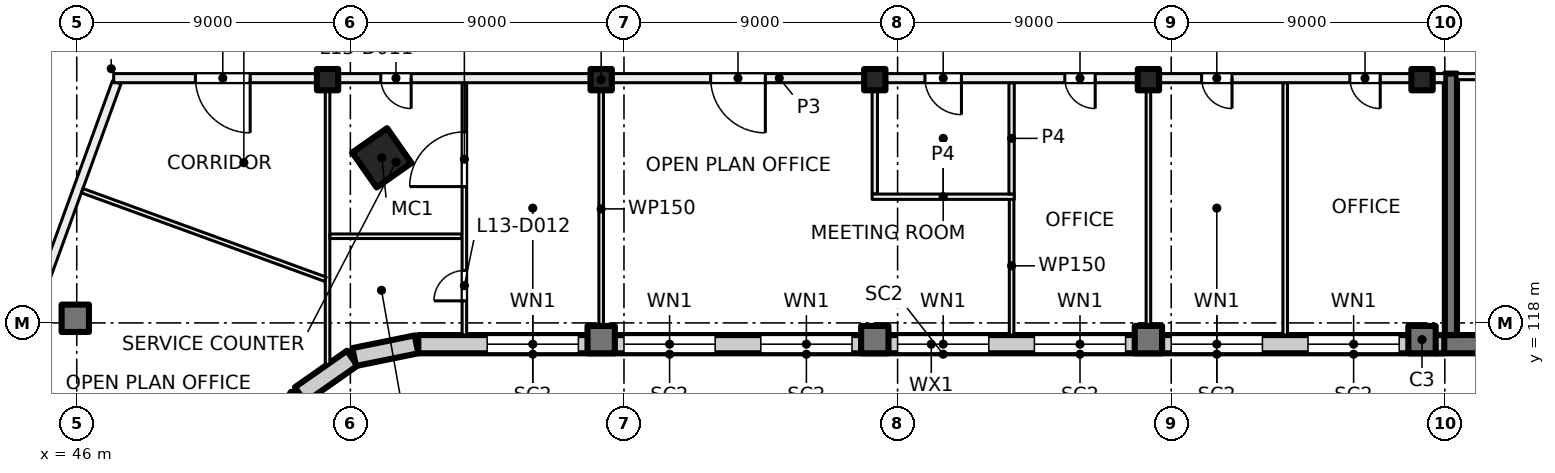
"""IFC4 building model, lengths in metres.
Left out: names, types, materials, properties, quantities, classifications, styles, units other than length and angle.
Written with IfcOpenShell. Run it as: python <this file> out.ifc"""

import sys

from ifc_helpers import new_model, si_unit, direction, frame, frame_2d, origin, origin_2d, place, context, subcontext, project, spatial, rectangle, hollow_rectangle, extrude, element, fill, save


model = new_model("IFC4")
c1 = context("Model", 3, precision=1e-05, world=origin(), true_north=direction((0.0, 1.0)))
c2 = subcontext(c1, "Body", "Model", "MODEL_VIEW")
j1 = project(units=[si_unit("LENGTHUNIT", "METRE"), si_unit("PLANEANGLEUNIT", "RADIAN")], contexts=[c1])
p1 = place(None, origin())
s1 = spatial("IfcSite", under=j1, at=p1, CompositionType="ELEMENT")
p2 = place(p1, origin())
s2 = spatial("IfcBuilding", under=s1, at=p2, CompositionType="ELEMENT")
p3 = place(p2, frame((0.0, 0.0, 59.5)))
s3 = spatial("IfcBuildingStorey", under=s2, at=p3, CompositionType="ELEMENT", Elevation=59.5)
p4 = place(p3, frame((56.036, 123.43, 0.0), z_axis=(0.0, 0.0, 1.0), x_axis=(0.573576436351, -0.819152044289, 0.0)))
e1 = element("IfcColumn", 1, at=p4, inside=s3, PredefinedType="COLUMN", context=c2, shape_type="SweptSolid", body=[
    extrude(hollow_rectangle(XDim=1.4, YDim=1.4, WallThickness=0.04, at=origin_2d()), origin(), (0.0, 0.0, 1.0), 4.0),
])
for number, where, z_axis, x_axis in (
    (2, (54.25, 126.0, 0.0), (0.0, 0.0, 1.0), (1.0, 0.0, 0.0)),
    (3, (63.25, 126.0, 0.0), (0.0, 0.0, 1.0), (1.0, 0.0, 0.0)),
    (4, (72.25, 126.0, 0.0), (0.0, 0.0, 1.0), (1.0, 0.0, 0.0)),
    (5, (81.25, 126.0, 0.0), (0.0, 0.0, 1.0), (1.0, 0.0, 0.0)),
    (6, (90.25, 126.0, 0.0), (0.0, 0.0, 1.0), (1.0, 0.0, 0.0)),
):
    element("IfcColumn", number, at=place(p3, frame(where, z_axis=z_axis, x_axis=x_axis)), inside=s3, PredefinedType="COLUMN", context=c2, shape_type="SweptSolid", body=[
        extrude(rectangle(XDim=0.7, YDim=0.7, at=origin_2d()), origin(), (0.0, 0.0, 1.0), 4.0),
    ])
for number, where, z_axis, x_axis in (
    (7, (45.952, 118.152, 0.0), (0.0, 0.0, 1.0), (1.0, 0.0, 0.0)),
    (8, (63.25, 117.45, 0.0), (0.0, 0.0, 1.0), (1.0, 0.0, 0.0)),
    (9, (72.25, 117.45, 0.0), (0.0, 0.0, 1.0), (1.0, 0.0, 0.0)),
    (10, (81.25, 117.45, 0.0), (0.0, 0.0, 1.0), (1.0, 0.0, 0.0)),
    (11, (90.25, 117.45, 0.0), (0.0, 0.0, 1.0), (1.0, 0.0, 0.0)),
):
    element("IfcColumn", number, at=place(p3, frame(where, z_axis=z_axis, x_axis=x_axis)), inside=s3, PredefinedType="COLUMN", context=c2, shape_type="SweptSolid", body=[
        extrude(rectangle(XDim=0.9, YDim=0.9, at=origin_2d()), origin(), (0.0, 0.0, 1.0), 4.0),
    ])
p5 = place(p3, frame((99.6, 117.3, 0.0), z_axis=(0.0, 0.0, 1.0), x_axis=(-1.0, 0.0, 0.0)))
e12 = element("IfcWall", 12, at=p5, inside=s3, PredefinedType="SHEAR", context=c2, shape_type="SweptSolid", body=[
    extrude(rectangle(XDim=8.9, YDim=0.6, at=frame_2d((4.45, 0.0))), origin(), (0.0, 0.0, 1.0), 4.0),
])
p6 = place(p3, frame((91.2, 126.2, 0.0), z_axis=(0.0, 0.0, 1.0), x_axis=(0.0, -1.0, 0.0)))
e13 = element("IfcWall", 13, at=p6, inside=s3, PredefinedType="SHEAR", context=c2, shape_type="SweptSolid", body=[
    extrude(rectangle(XDim=8.6, YDim=0.4, at=frame_2d((4.3, 0.0))), origin(), (0.0, 0.0, 1.0), 4.0),
])
p7 = place(p3, frame((53.305, 115.578, 0.0), z_axis=(0.0, 0.0, 1.0), x_axis=(-0.522402266438, -0.852699168535, 0.0)))
e14 = element("IfcWall", 14, at=p7, inside=s3, PredefinedType="SOLIDWALL", context=c2, shape_type="SweptSolid", body=[
    extrude(rectangle(XDim=2.042, YDim=0.6, at=frame_2d((1.021, 0.0))), origin(), (0.0, 0.0, 1.0), 3.625),
])
for number, where, z_axis, x_axis in (
    (15, (55.062, 116.839, 0.0), (0.0, 0.0, 1.0), (-0.819, -0.574, 0.0)),
    (16, (57.175, 117.294, 0.0), (0.0, 0.0, 1.0), (-0.98, -0.199, 0.0)),
):
    element("IfcWall", number, at=place(p3, frame(where, z_axis=z_axis, x_axis=x_axis)), inside=s3, PredefinedType="SOLIDWALL", context=c2, shape_type="SweptSolid", body=[
        extrude(rectangle(XDim=2.092, YDim=0.6, at=frame_2d((1.046, 0.0))), origin(), (0.0, 0.0, 1.0), 3.625),
    ])
p8 = place(p3, frame((90.98, 117.3, 0.0), z_axis=(0.0, 0.0, 1.0), x_axis=(-1.0, 0.0, 0.0)))
e17 = element("IfcWall", 17, at=p8, inside=s3, PredefinedType="SOLIDWALL", context=c2, shape_type="SweptSolid", body=[
    extrude(rectangle(XDim=33.745, YDim=0.6, at=frame_2d((16.873, 0.0))), origin(), (0.0, 0.0, 1.0), 3.625),
])
p9 = place(p8, frame((1.48, 0.0, 0.9)))
e18 = element("IfcOpeningElement", 18, at=p9, cuts=e17, PredefinedType="OPENING", context=c2, shape_type="SweptSolid", body=[
    extrude(rectangle(XDim=3.0, YDim=2.4, at=frame_2d((1.5, 1.2))), frame((0.0, 0.31, 0.0), z_axis=(0.0, -1.0, 0.0), x_axis=(1.0, 0.0, 0.0)), (0.0, 0.0, 1.0), 0.62),
])
p10 = place(p8, frame((5.98, 0.0, 0.9)))
e19 = element("IfcOpeningElement", 19, at=p10, cuts=e17, PredefinedType="OPENING", context=c2, shape_type="SweptSolid", body=[
    extrude(rectangle(XDim=3.0, YDim=2.4, at=frame_2d((1.5, 1.2))), frame((0.0, 0.31, 0.0), z_axis=(0.0, -1.0, 0.0), x_axis=(1.0, 0.0, 0.0)), (0.0, 0.0, 1.0), 0.62),
])
p11 = place(p8, frame((10.48, 0.0, 0.9)))
e20 = element("IfcOpeningElement", 20, at=p11, cuts=e17, PredefinedType="OPENING", context=c2, shape_type="SweptSolid", body=[
    extrude(rectangle(XDim=3.0, YDim=2.4, at=frame_2d((1.5, 1.2))), frame((0.0, 0.31, 0.0), z_axis=(0.0, -1.0, 0.0), x_axis=(1.0, 0.0, 0.0)), (0.0, 0.0, 1.0), 0.62),
])
p12 = place(p8, frame((14.98, 0.0, 0.9)))
e21 = element("IfcOpeningElement", 21, at=p12, cuts=e17, PredefinedType="OPENING", context=c2, shape_type="SweptSolid", body=[
    extrude(rectangle(XDim=3.0, YDim=2.4, at=frame_2d((1.5, 1.2))), frame((0.0, 0.31, 0.0), z_axis=(0.0, -1.0, 0.0), x_axis=(1.0, 0.0, 0.0)), (0.0, 0.0, 1.0), 0.62),
])
p13 = place(p8, frame((19.48, 0.0, 0.9)))
e22 = element("IfcOpeningElement", 22, at=p13, cuts=e17, PredefinedType="OPENING", context=c2, shape_type="SweptSolid", body=[
    extrude(rectangle(XDim=3.0, YDim=2.4, at=frame_2d((1.5, 1.2))), frame((0.0, 0.31, 0.0), z_axis=(0.0, -1.0, 0.0), x_axis=(1.0, 0.0, 0.0)), (0.0, 0.0, 1.0), 0.62),
])
p14 = place(p8, frame((23.98, 0.0, 0.9)))
e23 = element("IfcOpeningElement", 23, at=p14, cuts=e17, PredefinedType="OPENING", context=c2, shape_type="SweptSolid", body=[
    extrude(rectangle(XDim=3.0, YDim=2.4, at=frame_2d((1.5, 1.2))), frame((0.0, 0.31, 0.0), z_axis=(0.0, -1.0, 0.0), x_axis=(1.0, 0.0, 0.0)), (0.0, 0.0, 1.0), 0.62),
])
p15 = place(p8, frame((28.48, 0.0, 0.9)))
e24 = element("IfcOpeningElement", 24, at=p15, cuts=e17, PredefinedType="OPENING", context=c2, shape_type="SweptSolid", body=[
    extrude(rectangle(XDim=3.0, YDim=2.4, at=frame_2d((1.5, 1.2))), frame((0.0, 0.31, 0.0), z_axis=(0.0, -1.0, 0.0), x_axis=(1.0, 0.0, 0.0)), (0.0, 0.0, 1.0), 0.62),
])
p16 = place(p3, frame((95.2, 126.1, 0.0), z_axis=(0.0, 0.0, 1.0), x_axis=(-1.0, 0.0, 0.0)))
e25 = element("IfcWall", 25, at=p16, inside=s3, PredefinedType="PARTITIONING", context=c2, shape_type="SweptSolid", body=[
    extrude(rectangle(XDim=3.8, YDim=0.2, at=frame_2d((1.9, 0.0))), origin(), (0.0, 0.0, 1.0), 3.625),
])
p17 = place(p16, frame((0.3, 0.0, 0.0)))
e26 = element("IfcOpeningElement", 26, at=p17, cuts=e25, PredefinedType="OPENING", context=c2, shape_type="SweptSolid", body=[
    extrude(rectangle(XDim=1.2, YDim=2.1, at=frame_2d((0.6, 1.05))), frame((0.0, 0.11, 0.0), z_axis=(0.0, -1.0, 0.0), x_axis=(1.0, 0.0, 0.0)), (0.0, 0.0, 1.0), 0.22),
])
p18 = place(p3, frame((47.314, 125.909, 0.0), z_axis=(0.0, 0.0, 1.0), x_axis=(-0.342010770371, -0.939696032209, 0.0)))
e27 = element("IfcWall", 27, at=p18, inside=s3, PredefinedType="PARTITIONING", context=c2, shape_type="SweptSolid", body=[
    extrude(rectangle(XDim=31.485, YDim=0.3, at=frame_2d((15.742, 0.0))), origin(), (0.0, 0.0, 1.0), 3.625),
])
p19 = place(p18, frame((28.359, 0.0, 0.0)))
e28 = element("IfcOpeningElement", 28, at=p19, cuts=e27, PredefinedType="OPENING", context=c2, shape_type="SweptSolid", body=[
    extrude(rectangle(XDim=1.0, YDim=2.1, at=frame_2d((0.5, 1.05))), frame((0.0, 0.16, 0.0), z_axis=(0.0, -1.0, 0.0), x_axis=(1.0, 0.0, 0.0)), (0.0, 0.0, 1.0), 0.32),
])
p20 = place(p18, frame((23.484, 0.0, 0.0)))
e29 = element("IfcOpeningElement", 29, at=p20, cuts=e27, PredefinedType="OPENING", context=c2, shape_type="SweptSolid", body=[
    extrude(rectangle(XDim=1.0, YDim=2.1, at=frame_2d((0.5, 1.05))), frame((0.0, 0.16, 0.0), z_axis=(0.0, -1.0, 0.0), x_axis=(1.0, 0.0, 0.0)), (0.0, 0.0, 1.0), 0.32),
])
p21 = place(p18, frame((13.834, 0.0, 0.0)))
e30 = element("IfcOpeningElement", 30, at=p21, cuts=e27, PredefinedType="OPENING", context=c2, shape_type="SweptSolid", body=[
    extrude(rectangle(XDim=1.8, YDim=2.1, at=frame_2d((0.9, 1.05))), frame((0.0, 0.16, 0.0), z_axis=(0.0, -1.0, 0.0), x_axis=(1.0, 0.0, 0.0)), (0.0, 0.0, 1.0), 0.32),
])
p22 = place(p3, frame((54.25, 116.637, 0.0), z_axis=(0.0, 0.0, 1.0), x_axis=(0.0, 1.0, 0.0)))
e31 = element("IfcWall", 31, at=p22, inside=s3, PredefinedType="PARTITIONING", context=c2, shape_type="SweptSolid", body=[
    extrude(rectangle(XDim=9.263, YDim=0.15, at=frame_2d((4.631, 0.0))), origin(), (0.0, 0.0, 1.0), 3.625),
])
p23 = place(p3, frame((54.18, 119.436, 0.0), z_axis=(0.0, 0.0, 1.0), x_axis=(-0.939669476286, 0.342083725624, 0.0)))
e32 = element("IfcWall", 32, at=p23, inside=s3, PredefinedType="PARTITIONING", context=c2, shape_type="SweptSolid", body=[
    extrude(rectangle(XDim=8.516, YDim=0.15, at=frame_2d((4.258, 0.0))), origin(), (0.0, 0.0, 1.0), 3.625),
])
p24 = place(p3, frame((54.325, 120.85, 0.0), z_axis=(0.0, 0.0, 1.0), x_axis=(1.0, 0.0, 0.0)))
e33 = element("IfcWall", 33, at=p24, inside=s3, PredefinedType="PARTITIONING", context=c2, shape_type="SweptSolid", body=[
    extrude(rectangle(XDim=4.35, YDim=0.15, at=frame_2d((2.175, 0.0))), origin(), (0.0, 0.0, 1.0), 3.625),
])
p25 = place(p3, frame((58.75, 117.6, 0.0), z_axis=(0.0, 0.0, 1.0), x_axis=(0.0, 1.0, 0.0)))
e34 = element("IfcWall", 34, at=p25, inside=s3, PredefinedType="PARTITIONING", context=c2, shape_type="SweptSolid", body=[
    extrude(rectangle(XDim=8.3, YDim=0.15, at=frame_2d((4.15, 0.0))), origin(), (0.0, 0.0, 1.0), 3.625),
])
p26 = place(p25, frame((1.125, 0.0, 0.0)))
e35 = element("IfcOpeningElement", 35, at=p26, cuts=e34, PredefinedType="OPENING", context=c2, shape_type="SweptSolid", body=[
    extrude(rectangle(XDim=1.0, YDim=2.1, at=frame_2d((0.5, 1.05))), frame((0.0, 0.085, 0.0), z_axis=(0.0, -1.0, 0.0), x_axis=(1.0, 0.0, 0.0)), (0.0, 0.0, 1.0), 0.17),
])
p27 = place(p25, frame((4.884, 0.0, 0.0)))
e36 = element("IfcOpeningElement", 36, at=p27, cuts=e34, PredefinedType="OPENING", context=c2, shape_type="SweptSolid", body=[
    extrude(rectangle(XDim=1.8, YDim=2.1, at=frame_2d((0.9, 1.05))), frame((0.0, 0.085, 0.0), z_axis=(0.0, -1.0, 0.0), x_axis=(1.0, 0.0, 0.0)), (0.0, 0.0, 1.0), 0.17),
])
p28 = place(p3, frame((63.25, 117.6, 0.0), z_axis=(0.0, 0.0, 1.0), x_axis=(0.0, 1.0, 0.0)))
e37 = element("IfcWall", 37, at=p28, inside=s3, PredefinedType="PARTITIONING", context=c2, shape_type="SweptSolid", body=[
    extrude(rectangle(XDim=8.3, YDim=0.15, at=frame_2d((4.15, 0.0))), origin(), (0.0, 0.0, 1.0), 3.625),
])
p29 = place(p3, frame((72.25, 122.238, 0.0), z_axis=(0.0, 0.0, 1.0), x_axis=(0.0, 1.0, 0.0)))
e38 = element("IfcWall", 38, at=p29, inside=s3, PredefinedType="PARTITIONING", context=c2, shape_type="SweptSolid", body=[
    extrude(rectangle(XDim=3.662, YDim=0.175, at=frame_2d((1.831, 0.0))), origin(), (0.0, 0.0, 1.0), 3.625),
])
p30 = place(p3, frame((76.75, 117.6, 0.0), z_axis=(0.0, 0.0, 1.0), x_axis=(0.0, 1.0, 0.0)))
e39 = element("IfcWall", 39, at=p30, inside=s3, PredefinedType="PARTITIONING", context=c2, shape_type="SweptSolid", body=[
    extrude(rectangle(XDim=4.553, YDim=0.15, at=frame_2d((2.276, 0.0))), origin(), (0.0, 0.0, 1.0), 3.625),
])
p31 = place(p3, frame((76.838, 122.15, 0.0), z_axis=(0.0, 0.0, 1.0), x_axis=(-1.0, 0.0, 0.0)))
e40 = element("IfcWall", 40, at=p31, inside=s3, PredefinedType="PARTITIONING", context=c2, shape_type="SweptSolid", body=[
    extrude(rectangle(XDim=4.676, YDim=0.175, at=frame_2d((2.338, 0.0))), origin(), (0.0, 0.0, 1.0), 3.625),
])
p32 = place(p3, frame((76.75, 122.238, 0.0), z_axis=(0.0, 0.0, 1.0), x_axis=(0.0, 1.0, 0.0)))
e41 = element("IfcWall", 41, at=p32, inside=s3, PredefinedType="PARTITIONING", context=c2, shape_type="SweptSolid", body=[
    extrude(rectangle(XDim=3.662, YDim=0.175, at=frame_2d((1.831, 0.0))), origin(), (0.0, 0.0, 1.0), 3.625),
])
for number, where, z_axis, x_axis in (
    (42, (81.25, 117.6, 0.0), (0.0, 0.0, 1.0), (0.0, 1.0, 0.0)),
    (43, (85.75, 117.6, 0.0), (0.0, 0.0, 1.0), (0.0, 1.0, 0.0)),
):
    element("IfcWall", number, at=place(p3, frame(where, z_axis=z_axis, x_axis=x_axis)), inside=s3, PredefinedType="PARTITIONING", context=c2, shape_type="SweptSolid", body=[
        extrude(rectangle(XDim=8.3, YDim=0.15, at=frame_2d((4.15, 0.0))), origin(), (0.0, 0.0, 1.0), 3.625),
    ])
p33 = place(p3, frame((91.0, 126.05, 0.0), z_axis=(0.0, 0.0, 1.0), x_axis=(-1.0, 0.0, 0.0)))
e44 = element("IfcWall", 44, at=p33, inside=s3, PredefinedType="PARTITIONING", context=c2, shape_type="SweptSolid", body=[
    extrude(rectangle(XDim=43.785, YDim=0.3, at=frame_2d((21.893, 0.0))), origin(), (0.0, 0.0, 1.0), 3.625),
])
p34 = place(p33, frame((2.125, 0.0, 0.0)))
e45 = element("IfcOpeningElement", 45, at=p34, cuts=e44, PredefinedType="OPENING", context=c2, shape_type="SweptSolid", body=[
    extrude(rectangle(XDim=1.0, YDim=2.1, at=frame_2d((0.5, 1.05))), frame((0.0, 0.16, 0.0), z_axis=(0.0, -1.0, 0.0), x_axis=(1.0, 0.0, 0.0)), (0.0, 0.0, 1.0), 0.32),
])
p35 = place(p33, frame((7.0, 0.0, 0.0)))
e46 = element("IfcOpeningElement", 46, at=p35, cuts=e44, PredefinedType="OPENING", context=c2, shape_type="SweptSolid", body=[
    extrude(rectangle(XDim=1.0, YDim=2.1, at=frame_2d((0.5, 1.05))), frame((0.0, 0.16, 0.0), z_axis=(0.0, -1.0, 0.0), x_axis=(1.0, 0.0, 0.0)), (0.0, 0.0, 1.0), 0.32),
])
p36 = place(p33, frame((11.5, 0.0, 0.0)))
e47 = element("IfcOpeningElement", 47, at=p36, cuts=e44, PredefinedType="OPENING", context=c2, shape_type="SweptSolid", body=[
    extrude(rectangle(XDim=1.0, YDim=2.1, at=frame_2d((0.5, 1.05))), frame((0.0, 0.16, 0.0), z_axis=(0.0, -1.0, 0.0), x_axis=(1.0, 0.0, 0.0)), (0.0, 0.0, 1.0), 0.32),
])
p37 = place(p33, frame((15.9, 0.0, 0.0)))
e48 = element("IfcOpeningElement", 48, at=p37, cuts=e44, PredefinedType="OPENING", context=c2, shape_type="SweptSolid", body=[
    extrude(rectangle(XDim=1.2, YDim=2.1, at=frame_2d((0.6, 1.05))), frame((0.0, 0.16, 0.0), z_axis=(0.0, -1.0, 0.0), x_axis=(1.0, 0.0, 0.0)), (0.0, 0.0, 1.0), 0.32),
])
p38 = place(p33, frame((22.35, 0.0, 0.0)))
e49 = element("IfcOpeningElement", 49, at=p38, cuts=e44, PredefinedType="OPENING", context=c2, shape_type="SweptSolid", body=[
    extrude(rectangle(XDim=1.8, YDim=2.1, at=frame_2d((0.9, 1.05))), frame((0.0, 0.16, 0.0), z_axis=(0.0, -1.0, 0.0), x_axis=(1.0, 0.0, 0.0)), (0.0, 0.0, 1.0), 0.32),
])
p39 = place(p33, frame((34.0, 0.0, 0.0)))
e50 = element("IfcOpeningElement", 50, at=p39, cuts=e44, PredefinedType="OPENING", context=c2, shape_type="SweptSolid", body=[
    extrude(rectangle(XDim=1.0, YDim=2.1, at=frame_2d((0.5, 1.05))), frame((0.0, 0.16, 0.0), z_axis=(0.0, -1.0, 0.0), x_axis=(1.0, 0.0, 0.0)), (0.0, 0.0, 1.0), 0.32),
])
p40 = place(p33, frame((39.296, 0.0, 0.0)))
e51 = element("IfcOpeningElement", 51, at=p40, cuts=e44, PredefinedType="OPENING", context=c2, shape_type="SweptSolid", body=[
    extrude(rectangle(XDim=1.8, YDim=2.1, at=frame_2d((0.9, 1.05))), frame((0.0, 0.16, 0.0), z_axis=(0.0, -1.0, 0.0), x_axis=(1.0, 0.0, 0.0)), (0.0, 0.0, 1.0), 0.32),
])
p41 = place(p9, origin())
e52 = element("IfcWindow", 52, at=p41, inside=s3, PartitioningType="SINGLE_PANEL", PredefinedType="WINDOW", context=c2, shape_type="SweptSolid", body=[
    extrude(rectangle(XDim=3.0, YDim=2.4, at=frame_2d((1.5, 1.2))), frame((0.0, 0.03, 0.0), z_axis=(0.0, -1.0, 0.0), x_axis=(1.0, 0.0, 0.0)), (0.0, 0.0, 1.0), 0.06),
])
fill(e18, e52)
p42 = place(p10, origin())
e53 = element("IfcWindow", 53, at=p42, inside=s3, PartitioningType="SINGLE_PANEL", PredefinedType="WINDOW", context=c2, shape_type="SweptSolid", body=[
    extrude(rectangle(XDim=3.0, YDim=2.4, at=frame_2d((1.5, 1.2))), frame((0.0, 0.03, 0.0), z_axis=(0.0, -1.0, 0.0), x_axis=(1.0, 0.0, 0.0)), (0.0, 0.0, 1.0), 0.06),
])
fill(e19, e53)
p43 = place(p11, origin())
e54 = element("IfcWindow", 54, at=p43, inside=s3, PartitioningType="SINGLE_PANEL", PredefinedType="WINDOW", context=c2, shape_type="SweptSolid", body=[
    extrude(rectangle(XDim=3.0, YDim=2.4, at=frame_2d((1.5, 1.2))), frame((0.0, 0.03, 0.0), z_axis=(0.0, -1.0, 0.0), x_axis=(1.0, 0.0, 0.0)), (0.0, 0.0, 1.0), 0.06),
])
fill(e20, e54)
p44 = place(p12, origin())
e55 = element("IfcWindow", 55, at=p44, inside=s3, PartitioningType="SINGLE_PANEL", PredefinedType="WINDOW", context=c2, shape_type="SweptSolid", body=[
    extrude(rectangle(XDim=3.0, YDim=2.4, at=frame_2d((1.5, 1.2))), frame((0.0, 0.03, 0.0), z_axis=(0.0, -1.0, 0.0), x_axis=(1.0, 0.0, 0.0)), (0.0, 0.0, 1.0), 0.06),
])
fill(e21, e55)
p45 = place(p13, origin())
e56 = element("IfcWindow", 56, at=p45, inside=s3, PartitioningType="SINGLE_PANEL", PredefinedType="WINDOW", context=c2, shape_type="SweptSolid", body=[
    extrude(rectangle(XDim=3.0, YDim=2.4, at=frame_2d((1.5, 1.2))), frame((0.0, 0.03, 0.0), z_axis=(0.0, -1.0, 0.0), x_axis=(1.0, 0.0, 0.0)), (0.0, 0.0, 1.0), 0.06),
])
fill(e22, e56)
p46 = place(p14, origin())
e57 = element("IfcWindow", 57, at=p46, inside=s3, PartitioningType="SINGLE_PANEL", PredefinedType="WINDOW", context=c2, shape_type="SweptSolid", body=[
    extrude(rectangle(XDim=3.0, YDim=2.4, at=frame_2d((1.5, 1.2))), frame((0.0, 0.03, 0.0), z_axis=(0.0, -1.0, 0.0), x_axis=(1.0, 0.0, 0.0)), (0.0, 0.0, 1.0), 0.06),
])
fill(e23, e57)
p47 = place(p15, origin())
e58 = element("IfcWindow", 58, at=p47, inside=s3, PartitioningType="SINGLE_PANEL", PredefinedType="WINDOW", context=c2, shape_type="SweptSolid", body=[
    extrude(rectangle(XDim=3.0, YDim=2.4, at=frame_2d((1.5, 1.2))), frame((0.0, 0.03, 0.0), z_axis=(0.0, -1.0, 0.0), x_axis=(1.0, 0.0, 0.0)), (0.0, 0.0, 1.0), 0.06),
])
fill(e24, e58)
p48 = place(p34, origin())
e59 = element("IfcDoor", 59, at=p48, inside=s3, OperationType="SINGLE_SWING_LEFT", PredefinedType="DOOR", context=c2, shape_type="SweptSolid", body=[
    extrude(rectangle(XDim=1.0, YDim=2.1, at=frame_2d((0.5, 1.05))), frame((0.0, 0.025, 0.0), z_axis=(0.0, -1.0, 0.0), x_axis=(1.0, 0.0, 0.0)), (0.0, 0.0, 1.0), 0.05),
])
fill(e45, e59)
p49 = place(p35, origin())
e60 = element("IfcDoor", 60, at=p49, inside=s3, OperationType="SINGLE_SWING_RIGHT", PredefinedType="DOOR", context=c2, shape_type="SweptSolid", body=[
    extrude(rectangle(XDim=1.0, YDim=2.1, at=frame_2d((0.5, 1.05))), frame((0.0, 0.025, 0.0), z_axis=(0.0, -1.0, 0.0), x_axis=(1.0, 0.0, 0.0)), (0.0, 0.0, 1.0), 0.05),
])
fill(e46, e60)
p50 = place(p36, origin())
e61 = element("IfcDoor", 61, at=p50, inside=s3, OperationType="SINGLE_SWING_LEFT", PredefinedType="DOOR", context=c2, shape_type="SweptSolid", body=[
    extrude(rectangle(XDim=1.0, YDim=2.1, at=frame_2d((0.5, 1.05))), frame((0.0, 0.025, 0.0), z_axis=(0.0, -1.0, 0.0), x_axis=(1.0, 0.0, 0.0)), (0.0, 0.0, 1.0), 0.05),
])
fill(e47, e61)
p51 = place(p37, origin())
e62 = element("IfcDoor", 62, at=p51, inside=s3, OperationType="DOUBLE_DOOR_SINGLE_SWING", PredefinedType="DOOR", context=c2, shape_type="SweptSolid", body=[
    extrude(rectangle(XDim=1.2, YDim=2.1, at=frame_2d((0.6, 1.05))), frame((0.0, 0.025, 0.0), z_axis=(0.0, -1.0, 0.0), x_axis=(1.0, 0.0, 0.0)), (0.0, 0.0, 1.0), 0.05),
])
fill(e48, e62)
p52 = place(p38, origin())
e63 = element("IfcDoor", 63, at=p52, inside=s3, OperationType="DOUBLE_DOOR_SINGLE_SWING", PredefinedType="DOOR", context=c2, shape_type="SweptSolid", body=[
    extrude(rectangle(XDim=1.8, YDim=2.1, at=frame_2d((0.9, 1.05))), frame((0.0, 0.025, 0.0), z_axis=(0.0, -1.0, 0.0), x_axis=(1.0, 0.0, 0.0)), (0.0, 0.0, 1.0), 0.05),
])
fill(e49, e63)
p53 = place(p39, origin())
e64 = element("IfcDoor", 64, at=p53, inside=s3, OperationType="SINGLE_SWING_LEFT", PredefinedType="DOOR", context=c2, shape_type="SweptSolid", body=[
    extrude(rectangle(XDim=1.0, YDim=2.1, at=frame_2d((0.5, 1.05))), frame((0.0, 0.025, 0.0), z_axis=(0.0, -1.0, 0.0), x_axis=(1.0, 0.0, 0.0)), (0.0, 0.0, 1.0), 0.05),
])
fill(e50, e64)
p54 = place(p26, origin())
e65 = element("IfcDoor", 65, at=p54, inside=s3, OperationType="SINGLE_SWING_RIGHT", PredefinedType="DOOR", context=c2, shape_type="SweptSolid", body=[
    extrude(rectangle(XDim=1.0, YDim=2.1, at=frame_2d((0.5, 1.05))), frame((0.0, 0.025, 0.0), z_axis=(0.0, -1.0, 0.0), x_axis=(1.0, 0.0, 0.0)), (0.0, 0.0, 1.0), 0.05),
])
fill(e35, e65)
p55 = place(p27, origin())
e66 = element("IfcDoor", 66, at=p55, inside=s3, OperationType="DOUBLE_DOOR_SINGLE_SWING", PredefinedType="DOOR", context=c2, shape_type="SweptSolid", body=[
    extrude(rectangle(XDim=1.8, YDim=2.1, at=frame_2d((0.9, 1.05))), frame((0.0, 0.025, 0.0), z_axis=(0.0, -1.0, 0.0), x_axis=(1.0, 0.0, 0.0)), (0.0, 0.0, 1.0), 0.05),
])
fill(e36, e66)
p56 = place(p40, origin())
e67 = element("IfcDoor", 67, at=p56, inside=s3, OperationType="DOUBLE_DOOR_SINGLE_SWING", PredefinedType="DOOR", context=c2, shape_type="SweptSolid", body=[
    extrude(rectangle(XDim=1.8, YDim=2.1, at=frame_2d((0.9, 1.05))), frame((0.0, 0.025, 0.0), z_axis=(0.0, -1.0, 0.0), x_axis=(1.0, 0.0, 0.0)), (0.0, 0.0, 1.0), 0.05),
])
fill(e51, e67)
save(model, sys.argv[1])
